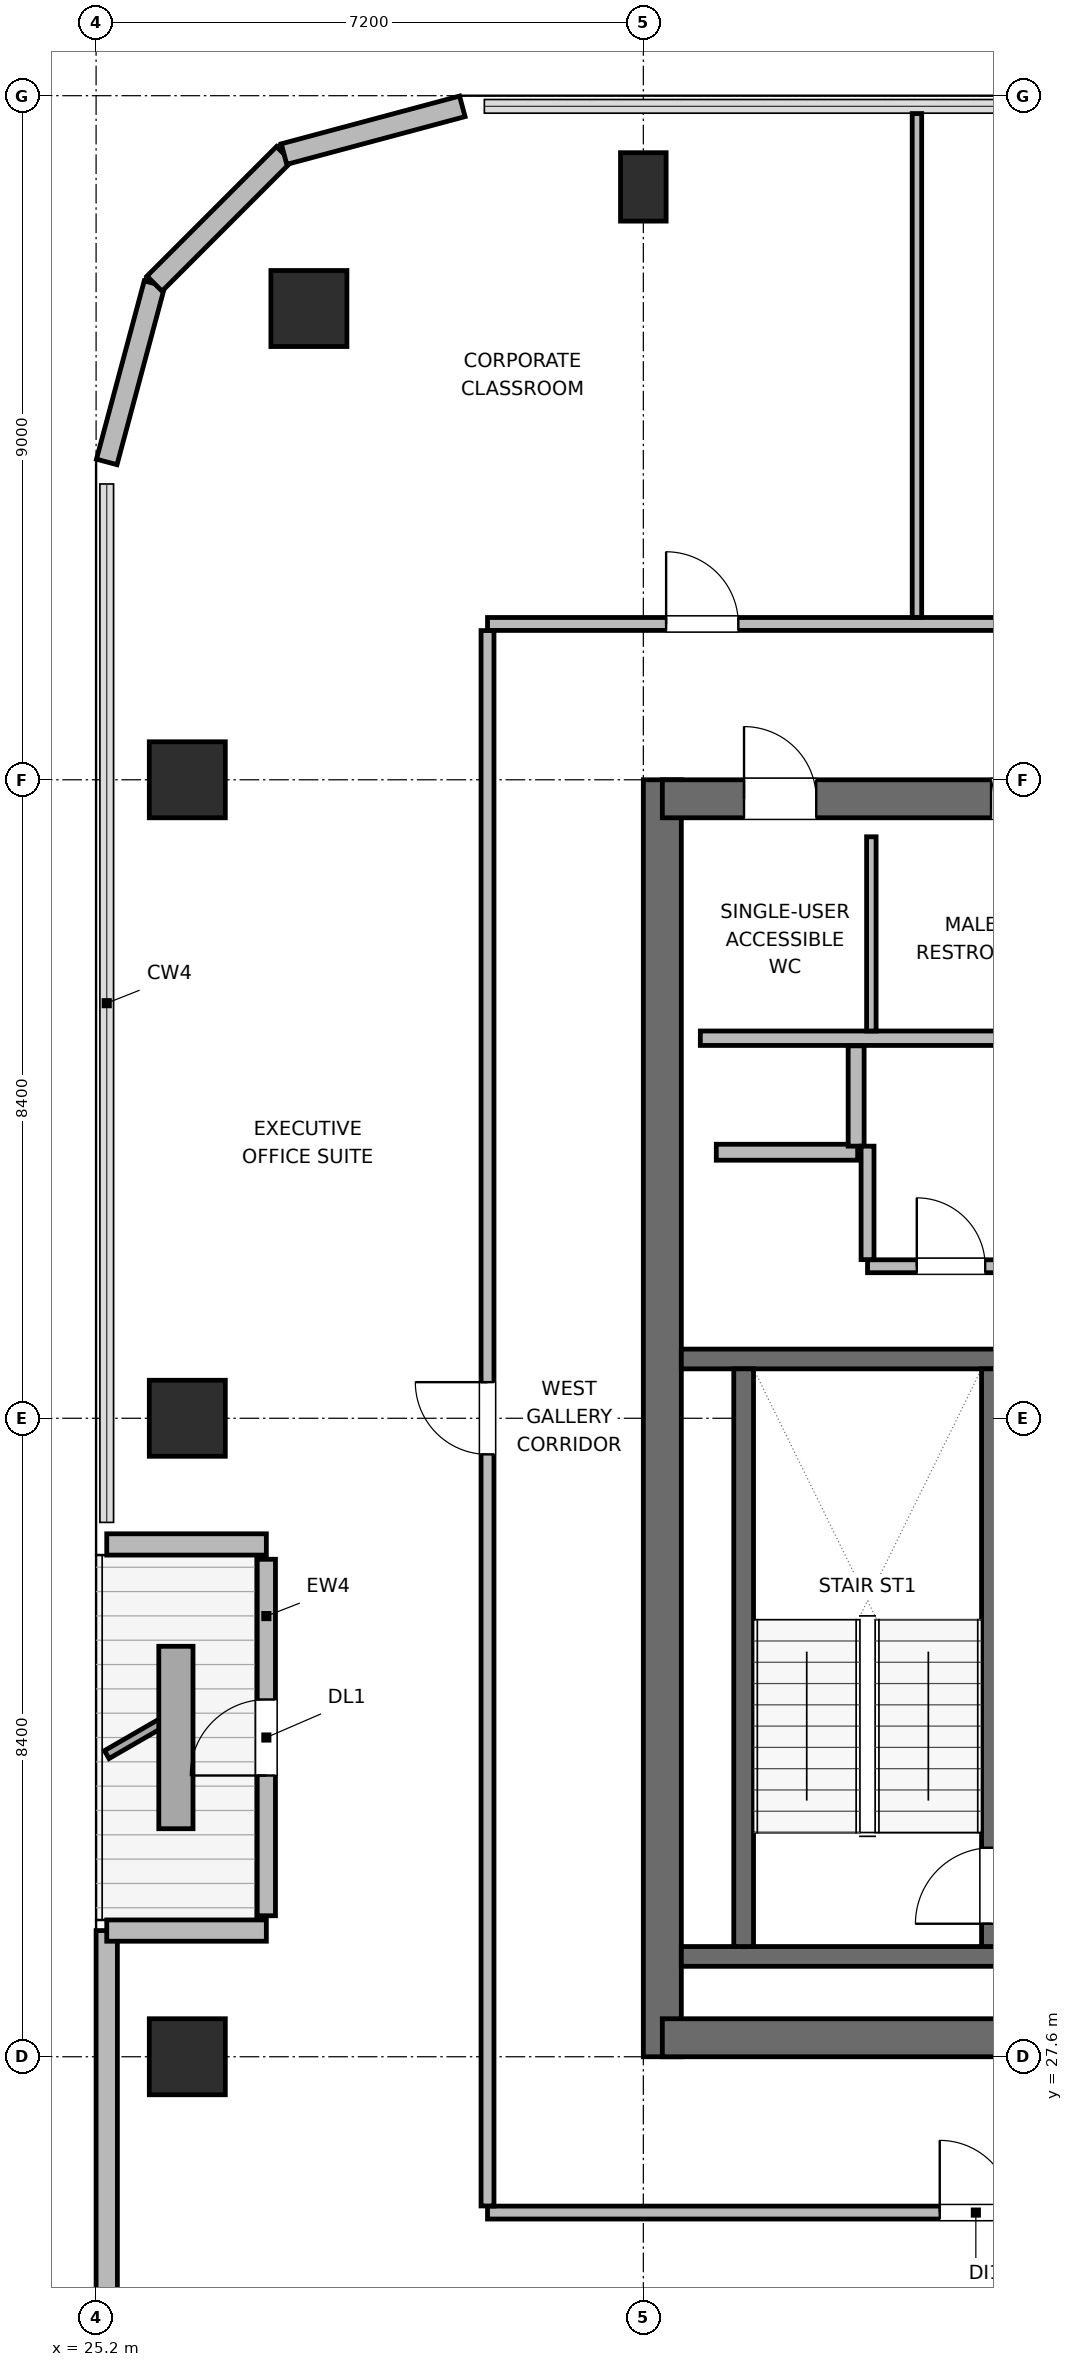
"""IFC4 building model, lengths in metres.
Left out: names, types, materials, properties, quantities, classifications, styles, units other than length and angle.
Written with IfcOpenShell. Run it as: python <this file> out.ifc"""

import sys

from ifc_helpers import new_model, si_unit, direction, frame, frame_2d, origin, origin_2d, place, context, subcontext, project, spatial, rectangle, circle, extrude, element, fill, save


model = new_model("IFC4")
c1 = context("Model", 3, precision=1e-05, world=origin(), true_north=direction((0.0, 1.0)))
c2 = subcontext(c1, "Body", "Model", "MODEL_VIEW")
j1 = project(units=[si_unit("LENGTHUNIT", "METRE"), si_unit("PLANEANGLEUNIT", "RADIAN")], contexts=[c1])
p1 = place(None, origin())
s1 = spatial("IfcSite", under=j1, at=p1, CompositionType="ELEMENT")
p2 = place(p1, origin())
s2 = spatial("IfcBuilding", under=s1, at=p2, CompositionType="ELEMENT")
p3 = place(p2, frame((0.0, 0.0, 278.4)))
s3 = spatial("IfcBuildingStorey", under=s2, at=p3, CompositionType="ELEMENT", Elevation=278.4)
p4 = place(p3, frame((32.65, 27.6, 0.0), z_axis=(0.0, 0.0, 1.0), x_axis=(0.0, 1.0, 0.0)))
e1 = element("IfcWall", 1, at=p4, inside=s3, PredefinedType="SHEAR", context=c2, shape_type="SweptSolid", body=[
    extrude(rectangle(XDim=16.8, YDim=0.5, at=frame_2d((8.4, 0.0))), origin(), (0.0, 0.0, 1.0), 3.9),
])
p5 = place(p3, frame((32.65, 27.85, 0.0), z_axis=(0.0, 0.0, 1.0), x_axis=(1.0, 0.0, 0.0)))
e2 = element("IfcWall", 2, at=p5, inside=s3, PredefinedType="SHEAR", context=c2, shape_type="SweptSolid", body=[
    extrude(rectangle(XDim=9.5, YDim=0.5, at=frame_2d((4.75, 0.0))), origin(), (0.0, 0.0, 1.0), 3.9),
])
p6 = place(p5, frame((5.075, 0.0, 0.0)))
e3 = element("IfcOpeningElement", 3, at=p6, cuts=e2, PredefinedType="OPENING", context=c2, shape_type="SweptSolid", body=[
    extrude(rectangle(XDim=1.05, YDim=2.04, at=frame_2d((0.525, 1.02))), frame((0.0, 0.26, 0.0), z_axis=(0.0, -1.0, 0.0), x_axis=(1.0, 0.0, 0.0)), (0.0, 0.0, 1.0), 0.52),
])
p7 = place(p3, frame((32.65, 44.15, 0.0), z_axis=(0.0, 0.0, 1.0), x_axis=(1.0, 0.0, 0.0)))
e4 = element("IfcWall", 4, at=p7, inside=s3, PredefinedType="SHEAR", context=c2, shape_type="SweptSolid", body=[
    extrude(rectangle(XDim=9.5, YDim=0.5, at=frame_2d((4.75, 0.0))), origin(), (0.0, 0.0, 1.0), 3.9),
])
p8 = place(p7, frame((1.075, 0.0, 0.0)))
e5 = element("IfcOpeningElement", 5, at=p8, cuts=e4, PredefinedType="OPENING", context=c2, shape_type="SweptSolid", body=[
    extrude(rectangle(XDim=0.95, YDim=2.04, at=frame_2d((0.475, 1.02))), frame((0.0, 0.26, 0.0), z_axis=(0.0, -1.0, 0.0), x_axis=(1.0, 0.0, 0.0)), (0.0, 0.0, 1.0), 0.52),
])
p9 = place(p7, frame((4.325, 0.0, 0.0)))
e6 = element("IfcOpeningElement", 6, at=p9, cuts=e4, PredefinedType="OPENING", context=c2, shape_type="SweptSolid", body=[
    extrude(rectangle(XDim=0.9, YDim=2.02, at=frame_2d((0.45, 1.01))), frame((0.0, 0.26, 0.0), z_axis=(0.0, -1.0, 0.0), x_axis=(1.0, 0.0, 0.0)), (0.0, 0.0, 1.0), 0.52),
])
p10 = place(p7, frame((7.225, 0.0, 0.0)))
e7 = element("IfcOpeningElement", 7, at=p10, cuts=e4, PredefinedType="OPENING", context=c2, shape_type="SweptSolid", body=[
    extrude(rectangle(XDim=0.9, YDim=2.02, at=frame_2d((0.45, 1.01))), frame((0.0, 0.26, 0.0), z_axis=(0.0, -1.0, 0.0), x_axis=(1.0, 0.0, 0.0)), (0.0, 0.0, 1.0), 0.52),
])
for number, where, z_axis, x_axis in (
    (8, (32.9, 28.92, 0.0), (0.0, 0.0, 1.0), (1.0, 0.0, 0.0)),
    (9, (32.9, 36.78, 0.0), (0.0, 0.0, 1.0), (1.0, 0.0, 0.0)),
):
    element("IfcWall", number, at=place(p3, frame(where, z_axis=z_axis, x_axis=x_axis)), inside=s3, PredefinedType="SHEAR", context=c2, shape_type="SweptSolid", body=[
        extrude(rectangle(XDim=4.21, YDim=0.26, at=frame_2d((2.105, 0.0))), origin(), (0.0, 0.0, 1.0), 3.9),
    ])
p11 = place(p3, frame((33.72, 29.05, 0.0), z_axis=(0.0, 0.0, 1.0), x_axis=(0.0, 1.0, 0.0)))
e10 = element("IfcWall", 10, at=p11, inside=s3, PredefinedType="SHEAR", context=c2, shape_type="SweptSolid", body=[
    extrude(rectangle(XDim=7.6, YDim=0.26, at=frame_2d((3.8, 0.0))), origin(), (0.0, 0.0, 1.0), 3.9),
])
p12 = place(p3, frame((36.98, 29.05, 0.0), z_axis=(0.0, 0.0, 1.0), x_axis=(0.0, 1.0, 0.0)))
e11 = element("IfcWall", 11, at=p12, inside=s3, PredefinedType="SHEAR", context=c2, shape_type="SweptSolid", body=[
    extrude(rectangle(XDim=7.6, YDim=0.26, at=frame_2d((3.8, 0.0))), origin(), (0.0, 0.0, 1.0), 3.9),
])
p13 = place(p12, frame((0.3, 0.0, 0.0)))
e12 = element("IfcOpeningElement", 12, at=p13, cuts=e11, PredefinedType="OPENING", context=c2, shape_type="SweptSolid", body=[
    extrude(rectangle(XDim=1.0, YDim=2.04, at=frame_2d((0.5, 1.02))), frame((0.0, 0.14, 0.0), z_axis=(0.0, -1.0, 0.0), x_axis=(1.0, 0.0, 0.0)), (0.0, 0.0, 1.0), 0.28),
])
p14 = place(p3, frame((28.0, 50.6, 0.0), z_axis=(0.0, 0.0, 1.0), x_axis=(1.0, 0.0, 0.0)))
e13 = element("IfcColumn", 13, at=p14, inside=s3, PredefinedType="COLUMN", context=c2, shape_type="SweptSolid", body=[
    extrude(circle(Radius=0.5, at=origin_2d()), origin(), (0.0, 0.0, 1.0), 3.9),
])
p15 = place(p3, frame((32.4, 52.2, 0.0), z_axis=(0.0, 0.0, 1.0), x_axis=(1.0, 0.0, 0.0)))
e14 = element("IfcColumn", 14, at=p15, inside=s3, PredefinedType="COLUMN", context=c2, shape_type="SweptSolid", body=[
    extrude(rectangle(XDim=0.6, YDim=0.9, at=origin_2d()), origin(), (0.0, 0.0, 1.0), 3.9),
])
for number, where, z_axis, x_axis in (
    (15, (26.4, 27.6, 0.0), (0.0, 0.0, 1.0), (1.0, 0.0, 0.0)),
    (16, (26.4, 36.0, 0.0), (0.0, 0.0, 1.0), (1.0, 0.0, 0.0)),
    (17, (26.4, 44.4, 0.0), (0.0, 0.0, 1.0), (1.0, 0.0, 0.0)),
):
    element("IfcColumn", number, at=place(p3, frame(where, z_axis=z_axis, x_axis=x_axis)), inside=s3, PredefinedType="COLUMN", context=c2, shape_type="SweptSolid", body=[
        extrude(rectangle(XDim=1.0, YDim=1.0, at=origin_2d()), origin(), (0.0, 0.0, 1.0), 3.9),
    ])
p16 = place(p3, frame((25.34, 23.418, 0.0), z_axis=(0.0, 0.0, 1.0), x_axis=(0.0, 1.0, 0.0)))
e18 = element("IfcWall", 18, at=p16, inside=s3, PredefinedType="SOLIDWALL", context=c2, shape_type="SweptSolid", body=[
    extrude(rectangle(XDim=5.842, YDim=0.28, at=frame_2d((2.921, 0.0))), origin(), (0.0, 0.0, 1.0), 3.6),
])
p17 = place(p3, frame((25.34, 29.26, 0.0), z_axis=(0.0, 0.0, 1.0), x_axis=(1.0, 0.0, 0.0)))
e19 = element("IfcWall", 19, at=p17, inside=s3, PredefinedType="SOLIDWALL", context=c2, shape_type="SweptSolid", body=[
    extrude(rectangle(XDim=2.1, YDim=0.28, at=frame_2d((1.05, 0.0))), origin(), (0.0, 0.0, 1.0), 3.046),
])
p18 = place(p3, frame((27.44, 29.455, 0.0), z_axis=(0.0, 0.0, 1.0), x_axis=(0.0, 1.0, 0.0)))
e20 = element("IfcWall", 20, at=p18, inside=s3, PredefinedType="SOLIDWALL", context=c2, shape_type="SweptSolid", body=[
    extrude(rectangle(XDim=4.69, YDim=0.24, at=frame_2d((2.345, 0.0))), origin(), (0.0, 0.0, 1.0), 3.231),
])
p19 = place(p18, frame((1.845, 0.0, 0.0)))
e21 = element("IfcOpeningElement", 21, at=p19, cuts=e20, PredefinedType="OPENING", context=c2, shape_type="SweptSolid", body=[
    extrude(rectangle(XDim=1.0, YDim=2.02, at=frame_2d((0.5, 1.01))), frame((0.0, 0.13, 0.0), z_axis=(0.0, -1.0, 0.0), x_axis=(1.0, 0.0, 0.0)), (0.0, 0.0, 1.0), 0.26),
])
p20 = place(p3, frame((27.44, 34.34, 0.0), z_axis=(0.0, 0.0, 1.0), x_axis=(-1.0, 0.0, 0.0)))
e22 = element("IfcWall", 22, at=p20, inside=s3, PredefinedType="SOLIDWALL", context=c2, shape_type="SweptSolid", body=[
    extrude(rectangle(XDim=2.1, YDim=0.28, at=frame_2d((1.05, 0.0))), origin(), (0.0, 0.0, 1.0), 3.046),
])
p21 = place(p3, frame((25.34, 48.582, 0.0), z_axis=(0.0, 0.0, 1.0), x_axis=(0.258751159445, 0.965944013639, 0.0)))
e23 = element("IfcWall", 23, at=p21, inside=s3, PredefinedType="SOLIDWALL", context=c2, shape_type="SweptSolid", body=[
    extrude(rectangle(XDim=2.429, YDim=0.28, at=frame_2d((1.214, 0.0))), origin(), (0.0, 0.0, 1.0), 3.6),
])
p22 = place(p3, frame((25.969, 50.927, 0.0), z_axis=(0.0, 0.0, 1.0), x_axis=(0.707106781187, 0.707106781187, 0.0)))
e24 = element("IfcWall", 24, at=p22, inside=s3, PredefinedType="SOLIDWALL", context=c2, shape_type="SweptSolid", body=[
    extrude(rectangle(XDim=2.41, YDim=0.28, at=frame_2d((1.205, 0.0))), origin(), (0.0, 0.0, 1.0), 3.6),
])
p23 = place(p3, frame((27.673, 52.632, 0.0), z_axis=(0.0, 0.0, 1.0), x_axis=(0.965937282298, 0.25877628691, 0.0)))
e25 = element("IfcWall", 25, at=p23, inside=s3, PredefinedType="SOLIDWALL", context=c2, shape_type="SweptSolid", body=[
    extrude(rectangle(XDim=2.428, YDim=0.28, at=frame_2d((1.214, 0.0))), origin(), (0.0, 0.0, 1.0), 3.6),
])
p24 = place(p3, frame((33.15, 41.0, 0.0), z_axis=(0.0, 0.0, 1.0), x_axis=(1.0, 0.0, 0.0)))
e26 = element("IfcWall", 26, at=p24, inside=s3, PredefinedType="PLUMBINGWALL", context=c2, shape_type="SweptSolid", body=[
    extrude(rectangle(XDim=8.5, YDim=0.19, at=frame_2d((4.25, 0.0))), origin(), (0.0, 0.0, 1.0), 3.6),
])
p25 = place(p3, frame((35.4, 41.095, 0.0), z_axis=(0.0, 0.0, 1.0), x_axis=(0.0, 1.0, 0.0)))
e27 = element("IfcWall", 27, at=p25, inside=s3, PredefinedType="PARTITIONING", context=c2, shape_type="SweptSolid", body=[
    extrude(rectangle(XDim=2.555, YDim=0.125, at=frame_2d((1.277, 0.0))), origin(), (0.0, 0.0, 1.0), 3.6),
])
p26 = place(p3, frame((33.36, 39.5, 0.0), z_axis=(0.0, 0.0, 1.0), x_axis=(1.0, 0.0, 0.0)))
e28 = element("IfcWall", 28, at=p26, inside=s3, PredefinedType="PARTITIONING", context=c2, shape_type="SweptSolid", body=[
    extrude(rectangle(XDim=1.86, YDim=0.21, at=frame_2d((0.93, 0.0))), origin(), (0.0, 0.0, 1.0), 3.6),
])
p27 = place(p3, frame((35.2, 39.58, 0.0), z_axis=(0.0, 0.0, 1.0), x_axis=(0.0, 1.0, 0.0)))
e29 = element("IfcWall", 29, at=p27, inside=s3, PredefinedType="PARTITIONING", context=c2, shape_type="SweptSolid", body=[
    extrude(rectangle(XDim=1.32, YDim=0.21, at=frame_2d((0.66, 0.0))), origin(), (0.0, 0.0, 1.0), 3.6),
])
p28 = place(p3, frame((35.35, 38.0, 0.0), z_axis=(0.0, 0.0, 1.0), x_axis=(1.0, 0.0, 0.0)))
e30 = element("IfcWall", 30, at=p28, inside=s3, PredefinedType="PARTITIONING", context=c2, shape_type="SweptSolid", body=[
    extrude(rectangle(XDim=6.1, YDim=0.17, at=frame_2d((3.05, 0.0))), origin(), (0.0, 0.0, 1.0), 3.6),
])
p29 = place(p28, frame((0.648, 0.0, 0.0)))
e31 = element("IfcOpeningElement", 31, at=p29, cuts=e30, PredefinedType="OPENING", context=c2, shape_type="SweptSolid", body=[
    extrude(rectangle(XDim=0.9, YDim=2.02, at=frame_2d((0.45, 1.01))), frame((0.0, 0.095, 0.0), z_axis=(0.0, -1.0, 0.0), x_axis=(1.0, 0.0, 0.0)), (0.0, 0.0, 1.0), 0.19),
])
p30 = place(p28, frame((3.698, 0.0, 0.0)))
e32 = element("IfcOpeningElement", 32, at=p30, cuts=e30, PredefinedType="OPENING", context=c2, shape_type="SweptSolid", body=[
    extrude(rectangle(XDim=0.9, YDim=2.02, at=frame_2d((0.45, 1.01))), frame((0.0, 0.095, 0.0), z_axis=(0.0, -1.0, 0.0), x_axis=(1.0, 0.0, 0.0)), (0.0, 0.0, 1.0), 0.19),
])
p31 = place(p3, frame((35.35, 38.087, 0.0), z_axis=(0.0, 0.0, 1.0), x_axis=(0.0, 1.0, 0.0)))
e33 = element("IfcWall", 33, at=p31, inside=s3, PredefinedType="PARTITIONING", context=c2, shape_type="SweptSolid", body=[
    extrude(rectangle(XDim=1.493, YDim=0.17, at=frame_2d((0.747, 0.0))), origin(), (0.0, 0.0, 1.0), 3.6),
])
p32 = place(p3, frame((30.35, 25.55, 0.0), z_axis=(0.0, 0.0, 1.0), x_axis=(1.0, 0.0, 0.0)))
e34 = element("IfcWall", 34, at=p32, inside=s3, PredefinedType="PARTITIONING", context=c2, shape_type="SweptSolid", body=[
    extrude(rectangle(XDim=33.25, YDim=0.17, at=frame_2d((16.625, 0.0))), origin(), (0.0, 0.0, 1.0), 3.6),
])
p33 = place(p32, frame((5.95, 0.0, 0.0)))
e35 = element("IfcOpeningElement", 35, at=p33, cuts=e34, PredefinedType="OPENING", context=c2, shape_type="SweptSolid", body=[
    extrude(rectangle(XDim=0.95, YDim=2.04, at=frame_2d((0.475, 1.02))), frame((0.0, 0.095, 0.0), z_axis=(0.0, -1.0, 0.0), x_axis=(1.0, 0.0, 0.0)), (0.0, 0.0, 1.0), 0.19),
])
p34 = place(p32, frame((22.575, 0.0, 0.0)))
e36 = element("IfcOpeningElement", 36, at=p34, cuts=e34, PredefinedType="OPENING", context=c2, shape_type="SweptSolid", body=[
    extrude(rectangle(XDim=0.95, YDim=2.04, at=frame_2d((0.475, 1.02))), frame((0.0, 0.095, 0.0), z_axis=(0.0, -1.0, 0.0), x_axis=(1.0, 0.0, 0.0)), (0.0, 0.0, 1.0), 0.19),
])
p35 = place(p3, frame((30.35, 46.45, 0.0), z_axis=(0.0, 0.0, 1.0), x_axis=(1.0, 0.0, 0.0)))
e37 = element("IfcWall", 37, at=p35, inside=s3, PredefinedType="PARTITIONING", context=c2, shape_type="SweptSolid", body=[
    extrude(rectangle(XDim=33.25, YDim=0.17, at=frame_2d((16.625, 0.0))), origin(), (0.0, 0.0, 1.0), 3.6),
])
p36 = place(p35, frame((2.35, 0.0, 0.0)))
e38 = element("IfcOpeningElement", 38, at=p36, cuts=e37, PredefinedType="OPENING", context=c2, shape_type="SweptSolid", body=[
    extrude(rectangle(XDim=0.95, YDim=2.04, at=frame_2d((0.475, 1.02))), frame((0.0, 0.095, 0.0), z_axis=(0.0, -1.0, 0.0), x_axis=(1.0, 0.0, 0.0)), (0.0, 0.0, 1.0), 0.19),
])
p37 = place(p35, frame((7.275, 0.0, 0.0)))
e39 = element("IfcOpeningElement", 39, at=p37, cuts=e37, PredefinedType="OPENING", context=c2, shape_type="SweptSolid", body=[
    extrude(rectangle(XDim=0.95, YDim=2.04, at=frame_2d((0.475, 1.02))), frame((0.0, 0.095, 0.0), z_axis=(0.0, -1.0, 0.0), x_axis=(1.0, 0.0, 0.0)), (0.0, 0.0, 1.0), 0.19),
])
p38 = place(p35, frame((12.475, 0.0, 0.0)))
e40 = element("IfcOpeningElement", 40, at=p38, cuts=e37, PredefinedType="OPENING", context=c2, shape_type="SweptSolid", body=[
    extrude(rectangle(XDim=0.95, YDim=2.04, at=frame_2d((0.475, 1.02))), frame((0.0, 0.095, 0.0), z_axis=(0.0, -1.0, 0.0), x_axis=(1.0, 0.0, 0.0)), (0.0, 0.0, 1.0), 0.19),
])
p39 = place(p35, frame((18.175, 0.0, 0.0)))
e41 = element("IfcOpeningElement", 41, at=p39, cuts=e37, PredefinedType="OPENING", context=c2, shape_type="SweptSolid", body=[
    extrude(rectangle(XDim=0.95, YDim=2.04, at=frame_2d((0.475, 1.02))), frame((0.0, 0.095, 0.0), z_axis=(0.0, -1.0, 0.0), x_axis=(1.0, 0.0, 0.0)), (0.0, 0.0, 1.0), 0.19),
])
p40 = place(p35, frame((23.175, 0.0, 0.0)))
e42 = element("IfcOpeningElement", 42, at=p40, cuts=e37, PredefinedType="OPENING", context=c2, shape_type="SweptSolid", body=[
    extrude(rectangle(XDim=0.95, YDim=2.04, at=frame_2d((0.475, 1.02))), frame((0.0, 0.095, 0.0), z_axis=(0.0, -1.0, 0.0), x_axis=(1.0, 0.0, 0.0)), (0.0, 0.0, 1.0), 0.19),
])
p41 = place(p35, frame((27.675, 0.0, 0.0)))
e43 = element("IfcOpeningElement", 43, at=p41, cuts=e37, PredefinedType="OPENING", context=c2, shape_type="SweptSolid", body=[
    extrude(rectangle(XDim=0.95, YDim=2.04, at=frame_2d((0.475, 1.02))), frame((0.0, 0.095, 0.0), z_axis=(0.0, -1.0, 0.0), x_axis=(1.0, 0.0, 0.0)), (0.0, 0.0, 1.0), 0.19),
])
p42 = place(p35, frame((31.275, 0.0, 0.0)))
e44 = element("IfcOpeningElement", 44, at=p42, cuts=e37, PredefinedType="OPENING", context=c2, shape_type="SweptSolid", body=[
    extrude(rectangle(XDim=0.95, YDim=2.04, at=frame_2d((0.475, 1.02))), frame((0.0, 0.095, 0.0), z_axis=(0.0, -1.0, 0.0), x_axis=(1.0, 0.0, 0.0)), (0.0, 0.0, 1.0), 0.19),
])
p43 = place(p3, frame((30.35, 25.637, 0.0), z_axis=(0.0, 0.0, 1.0), x_axis=(0.0, 1.0, 0.0)))
e45 = element("IfcWall", 45, at=p43, inside=s3, PredefinedType="PARTITIONING", context=c2, shape_type="SweptSolid", body=[
    extrude(rectangle(XDim=20.726, YDim=0.17, at=frame_2d((10.363, 0.0))), origin(), (0.0, 0.0, 1.0), 3.6),
])
p44 = place(p43, frame((9.888, 0.0, 0.0)))
e46 = element("IfcOpeningElement", 46, at=p44, cuts=e45, PredefinedType="OPENING", context=c2, shape_type="SweptSolid", body=[
    extrude(rectangle(XDim=0.95, YDim=2.04, at=frame_2d((0.475, 1.02))), frame((0.0, 0.095, 0.0), z_axis=(0.0, -1.0, 0.0), x_axis=(1.0, 0.0, 0.0)), (0.0, 0.0, 1.0), 0.19),
])
p45 = place(p3, frame((36.0, 46.537, 0.0), z_axis=(0.0, 0.0, 1.0), x_axis=(0.0, 1.0, 0.0)))
e47 = element("IfcWall", 47, at=p45, inside=s3, PredefinedType="PARTITIONING", context=c2, shape_type="SweptSolid", body=[
    extrude(rectangle(XDim=6.628, YDim=0.125, at=frame_2d((3.314, 0.0))), origin(), (0.0, 0.0, 1.0), 3.6),
])
p46 = place(p19, origin())
e48 = element("IfcDoor", 48, at=p46, inside=s3, OperationType="SINGLE_SWING_LEFT", PredefinedType="DOOR", context=c2, shape_type="SweptSolid", body=[
    extrude(rectangle(XDim=1.0, YDim=2.02, at=frame_2d((0.5, 1.01))), frame((0.0, 0.025, 0.0), z_axis=(0.0, -1.0, 0.0), x_axis=(1.0, 0.0, 0.0)), (0.0, 0.0, 1.0), 0.05),
])
fill(e21, e48)
p47 = place(p13, origin())
e49 = element("IfcDoor", 49, at=p47, inside=s3, OperationType="SINGLE_SWING_LEFT", PredefinedType="DOOR", context=c2, shape_type="SweptSolid", body=[
    extrude(rectangle(XDim=1.0, YDim=2.04, at=frame_2d((0.5, 1.02))), frame((0.0, 0.025, 0.0), z_axis=(0.0, -1.0, 0.0), x_axis=(1.0, 0.0, 0.0)), (0.0, 0.0, 1.0), 0.05),
])
fill(e12, e49)
p48 = place(p8, origin())
e50 = element("IfcDoor", 50, at=p48, inside=s3, OperationType="SINGLE_SWING_LEFT", PredefinedType="DOOR", context=c2, shape_type="SweptSolid", body=[
    extrude(rectangle(XDim=0.95, YDim=2.04, at=frame_2d((0.475, 1.02))), frame((0.0, 0.025, 0.0), z_axis=(0.0, -1.0, 0.0), x_axis=(1.0, 0.0, 0.0)), (0.0, 0.0, 1.0), 0.05),
])
fill(e5, e50)
p49 = place(p9, origin())
e51 = element("IfcDoor", 51, at=p49, inside=s3, OperationType="SINGLE_SWING_RIGHT", PredefinedType="DOOR", context=c2, shape_type="SweptSolid", body=[
    extrude(rectangle(XDim=0.9, YDim=2.02, at=frame_2d((0.45, 1.01))), frame((0.0, 0.025, 0.0), z_axis=(0.0, -1.0, 0.0), x_axis=(1.0, 0.0, 0.0)), (0.0, 0.0, 1.0), 0.05),
])
fill(e6, e51)
p50 = place(p29, origin())
e52 = element("IfcDoor", 52, at=p50, inside=s3, OperationType="SINGLE_SWING_LEFT", PredefinedType="DOOR", context=c2, shape_type="SweptSolid", body=[
    extrude(rectangle(XDim=0.9, YDim=2.02, at=frame_2d((0.45, 1.01))), frame((0.0, 0.025, 0.0), z_axis=(0.0, -1.0, 0.0), x_axis=(1.0, 0.0, 0.0)), (0.0, 0.0, 1.0), 0.05),
])
fill(e31, e52)
p51 = place(p33, origin())
e53 = element("IfcDoor", 53, at=p51, inside=s3, OperationType="SINGLE_SWING_LEFT", PredefinedType="DOOR", context=c2, shape_type="SweptSolid", body=[
    extrude(rectangle(XDim=0.95, YDim=2.04, at=frame_2d((0.475, 1.02))), frame((0.0, 0.025, 0.0), z_axis=(0.0, -1.0, 0.0), x_axis=(1.0, 0.0, 0.0)), (0.0, 0.0, 1.0), 0.05),
])
fill(e35, e53)
p52 = place(p36, origin())
e54 = element("IfcDoor", 54, at=p52, inside=s3, OperationType="SINGLE_SWING_LEFT", PredefinedType="DOOR", context=c2, shape_type="SweptSolid", body=[
    extrude(rectangle(XDim=0.95, YDim=2.04, at=frame_2d((0.475, 1.02))), frame((0.0, 0.025, 0.0), z_axis=(0.0, -1.0, 0.0), x_axis=(1.0, 0.0, 0.0)), (0.0, 0.0, 1.0), 0.05),
])
fill(e38, e54)
p53 = place(p44, origin())
e55 = element("IfcDoor", 55, at=p53, inside=s3, OperationType="SINGLE_SWING_RIGHT", PredefinedType="DOOR", context=c2, shape_type="SweptSolid", body=[
    extrude(rectangle(XDim=0.95, YDim=2.04, at=frame_2d((0.475, 1.02))), frame((0.0, 0.025, 0.0), z_axis=(0.0, -1.0, 0.0), x_axis=(1.0, 0.0, 0.0)), (0.0, 0.0, 1.0), 0.05),
])
fill(e46, e55)
save(model, sys.argv[1])
